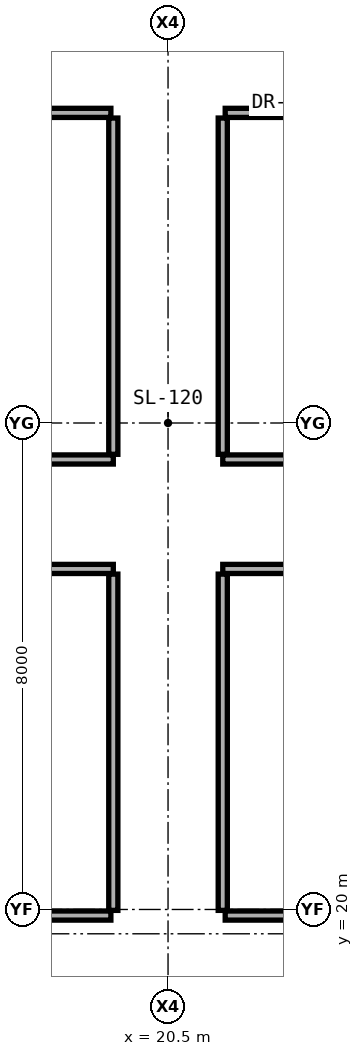
"""IFC4 building model, lengths in metres.
Left out: names, types, materials, properties, quantities, classifications, styles, units other than length and angle.
Written with IfcOpenShell. Run it as: python <this file> out.ifc"""

import sys

from ifc_helpers import new_model, si_unit, direction, frame, frame_2d, origin, place, context, subcontext, project, spatial, rectangle, extrude, element, save


model = new_model("IFC4")
c1 = context("Model", 3, precision=1e-05, world=origin(), true_north=direction((0.0, 1.0)))
c2 = subcontext(c1, "Body", "Model", "MODEL_VIEW")
j1 = project(units=[si_unit("LENGTHUNIT", "METRE"), si_unit("PLANEANGLEUNIT", "RADIAN")], contexts=[c1])
p1 = place(None, origin())
s1 = spatial("IfcSite", under=j1, at=p1, CompositionType="ELEMENT")
p2 = place(p1, origin())
s2 = spatial("IfcBuilding", under=s1, at=p2, CompositionType="ELEMENT")
p3 = place(p2, frame((0.0, 0.0, 121.4)))
s3 = spatial("IfcBuildingStorey", under=s2, at=p3, CompositionType="ELEMENT", Elevation=121.4)
p4 = place(p3, frame((10.22, 19.9, 0.0), z_axis=(0.0, 0.0, 1.0), x_axis=(1.0, 0.0, 0.0)))
e1 = element("IfcWall", 1, at=p4, inside=s3, PredefinedType="PARTITIONING", context=c2, shape_type="SweptSolid", body=[
    extrude(rectangle(XDim=9.34, YDim=0.15, at=frame_2d((4.67, 0.0))), origin(), (0.0, 0.0, 1.0), 2.216),
])
p5 = place(p4, frame((1.66, 0.0, 0.0)))
e2 = element("IfcOpeningElement", 2, at=p5, cuts=e1, PredefinedType="OPENING", context=c2, shape_type="SweptSolid", body=[
    extrude(rectangle(XDim=0.9, YDim=2.1, at=frame_2d((0.45, 1.05))), frame((0.0, 0.085, 0.0), z_axis=(0.0, -1.0, 0.0), x_axis=(1.0, 0.0, 0.0)), (0.0, 0.0, 1.0), 0.17),
])
p6 = place(p4, frame((5.665, 0.0, 0.0)))
e3 = element("IfcOpeningElement", 3, at=p6, cuts=e1, PredefinedType="OPENING", context=c2, shape_type="SweptSolid", body=[
    extrude(rectangle(XDim=0.95, YDim=2.15, at=frame_2d((0.475, 1.075))), frame((0.0, 0.085, 0.0), z_axis=(0.0, -1.0, 0.0), x_axis=(1.0, 0.0, 0.0)), (0.0, 0.0, 1.0), 0.17),
])
p7 = place(p3, frame((21.44, 19.9, 0.0), z_axis=(0.0, 0.0, 1.0), x_axis=(1.0, 0.0, 0.0)))
e4 = element("IfcWall", 4, at=p7, inside=s3, PredefinedType="PARTITIONING", context=c2, shape_type="SweptSolid", body=[
    extrude(rectangle(XDim=9.32, YDim=0.15, at=frame_2d((4.66, 0.0))), origin(), (0.0, 0.0, 1.0), 2.216),
])
p8 = place(p7, frame((4.185, 0.0, 0.0)))
e5 = element("IfcOpeningElement", 5, at=p8, cuts=e4, PredefinedType="OPENING", context=c2, shape_type="SweptSolid", body=[
    extrude(rectangle(XDim=0.95, YDim=2.15, at=frame_2d((0.475, 1.075))), frame((0.0, 0.085, 0.0), z_axis=(0.0, -1.0, 0.0), x_axis=(1.0, 0.0, 0.0)), (0.0, 0.0, 1.0), 0.17),
])
for number, where, z_axis, x_axis in (
    (6, (10.24, 25.6, 0.0), (0.0, 0.0, 1.0), (1.0, 0.0, 0.0)),
    (7, (21.4, 25.6, 0.0), (0.0, 0.0, 1.0), (1.0, 0.0, 0.0)),
    (8, (10.24, 27.4, 0.0), (0.0, 0.0, 1.0), (1.0, 0.0, 0.0)),
    (9, (21.4, 27.4, 0.0), (0.0, 0.0, 1.0), (1.0, 0.0, 0.0)),
):
    element("IfcWall", number, at=place(p3, frame(where, z_axis=z_axis, x_axis=x_axis)), inside=s3, PredefinedType="PARTITIONING", context=c2, shape_type="SweptSolid", body=[
        extrude(rectangle(XDim=9.36, YDim=0.15, at=frame_2d((4.68, 0.0))), origin(), (0.0, 0.0, 1.0), 2.216),
    ])
p9 = place(p3, frame((10.24, 33.1, 0.0), z_axis=(0.0, 0.0, 1.0), x_axis=(1.0, 0.0, 0.0)))
e10 = element("IfcWall", 10, at=p9, inside=s3, PredefinedType="PARTITIONING", context=c2, shape_type="SweptSolid", body=[
    extrude(rectangle(XDim=9.32, YDim=0.15, at=frame_2d((4.66, 0.0))), origin(), (0.0, 0.0, 1.0), 2.216),
])
p10 = place(p3, frame((21.44, 33.1, 0.0), z_axis=(0.0, 0.0, 1.0), x_axis=(1.0, 0.0, 0.0)))
e11 = element("IfcWall", 11, at=p10, inside=s3, PredefinedType="PARTITIONING", context=c2, shape_type="SweptSolid", body=[
    extrude(rectangle(XDim=9.32, YDim=0.15, at=frame_2d((4.66, 0.0))), origin(), (0.0, 0.0, 1.0), 2.216),
])
p11 = place(p10, frame((4.185, 0.0, 0.0)))
e12 = element("IfcOpeningElement", 12, at=p11, cuts=e11, PredefinedType="OPENING", context=c2, shape_type="SweptSolid", body=[
    extrude(rectangle(XDim=0.95, YDim=2.15, at=frame_2d((0.475, 1.075))), frame((0.0, 0.085, 0.0), z_axis=(0.0, -1.0, 0.0), x_axis=(1.0, 0.0, 0.0)), (0.0, 0.0, 1.0), 0.17),
])
for number, where, z_axis, x_axis in (
    (13, (19.6, 19.985, 0.0), (0.0, 0.0, 1.0), (0.0, 1.0, 0.0)),
    (14, (19.6, 27.485, 0.0), (0.0, 0.0, 1.0), (0.0, 1.0, 0.0)),
    (15, (21.4, 19.985, 0.0), (0.0, 0.0, 1.0), (0.0, 1.0, 0.0)),
    (16, (21.4, 27.485, 0.0), (0.0, 0.0, 1.0), (0.0, 1.0, 0.0)),
):
    element("IfcWall", number, at=place(p3, frame(where, z_axis=z_axis, x_axis=x_axis)), inside=s3, PredefinedType="PARTITIONING", context=c2, shape_type="SweptSolid", body=[
        extrude(rectangle(XDim=5.53, YDim=0.15, at=frame_2d((2.765, 0.0))), origin(), (0.0, 0.0, 1.0), 2.216),
    ])
save(model, sys.argv[1])
